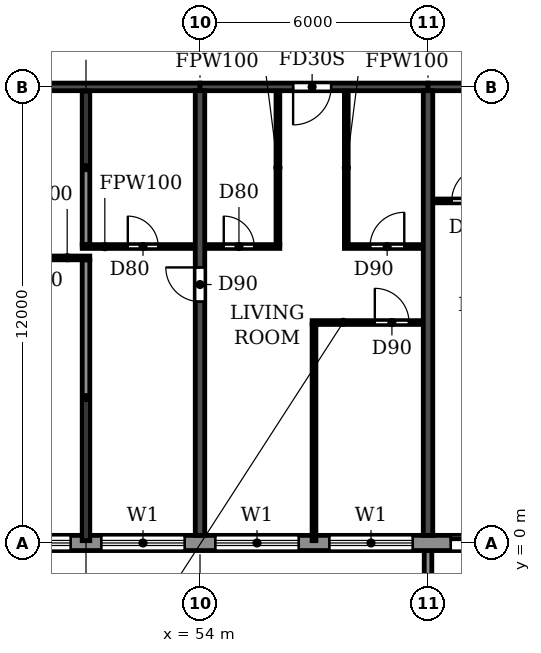
"""IFC4 building model, lengths in metres.
Left out: names, types, materials, properties, quantities, classifications, styles, units other than length and angle.
Written with IfcOpenShell. Run it as: python <this file> out.ifc"""

import sys

from ifc_helpers import new_model, si_unit, direction, frame, frame_2d, origin, place, context, subcontext, project, spatial, polyline, rectangle, outline, extrude, source, transform, mapped, element, fill, save


model = new_model("IFC4")
c1 = context("Model", 3, precision=1e-05, world=origin(), true_north=direction((0.0, 1.0)))
c2 = subcontext(c1, "Body", "Model", "MODEL_VIEW")
j1 = project(units=[si_unit("LENGTHUNIT", "METRE"), si_unit("PLANEANGLEUNIT", "RADIAN")], contexts=[c1])
p1 = place(None, origin())
s1 = spatial("IfcSite", under=j1, at=p1, CompositionType="ELEMENT")
p2 = place(p1, origin())
s2 = spatial("IfcBuilding", under=s1, at=p2, CompositionType="ELEMENT")
p3 = place(p2, frame((0.0, 0.0, 241.2)))
s3 = spatial("IfcBuildingStorey", under=s2, at=p3, CompositionType="ELEMENT", Elevation=241.2)
p4 = place(p3, frame((54.0, 0.2, 0.0), z_axis=(0.0, 0.0, 1.0), x_axis=(0.0, 1.0, 0.0)))
e1 = element("IfcWall", 1, at=p4, inside=s3, PredefinedType="SHEAR", context=c2, shape_type="SweptSolid", body=[
    extrude(rectangle(XDim=11.7, YDim=0.25, at=frame_2d((5.85, 0.0))), origin(), (0.0, 0.0, 1.0), 3.08),
])
p5 = place(p4, frame((6.15, 0.0, 0.0)))
e2 = element("IfcOpeningElement", 2, at=p5, cuts=e1, PredefinedType="OPENING", context=c2, shape_type="SweptSolid", body=[
    extrude(rectangle(XDim=0.9, YDim=2.1, at=frame_2d((0.45, 1.05))), frame((0.0, 0.135, 0.0), z_axis=(0.0, -1.0, 0.0), x_axis=(1.0, 0.0, 0.0)), (0.0, 0.0, 1.0), 0.27),
])
p6 = place(p3, frame((60.0, 0.2, 0.0), z_axis=(0.0, 0.0, 1.0), x_axis=(0.0, 1.0, 0.0)))
e3 = element("IfcWall", 3, at=p6, inside=s3, PredefinedType="SHEAR", context=c2, shape_type="SweptSolid", body=[
    extrude(rectangle(XDim=11.7, YDim=0.25, at=frame_2d((5.85, 0.0))), origin(), (0.0, 0.0, 1.0), 3.08),
])
p7 = place(p3, frame((48.0, 12.0, 0.0), z_axis=(0.0, 0.0, 1.0), x_axis=(1.0, 0.0, 0.0)))
e4 = element("IfcWall", 4, at=p7, inside=s3, PredefinedType="SHEAR", context=c2, shape_type="SweptSolid", body=[
    extrude(rectangle(XDim=6.0, YDim=0.2, at=frame_2d((3.0, 0.0))), origin(), (0.0, 0.0, 1.0), 2.48),
])
p8 = place(p3, frame((54.0, 12.0, 0.0), z_axis=(0.0, 0.0, 1.0), x_axis=(1.0, 0.0, 0.0)))
e5 = element("IfcWall", 5, at=p8, inside=s3, PredefinedType="SHEAR", context=c2, shape_type="SweptSolid", body=[
    extrude(rectangle(XDim=6.0, YDim=0.2, at=frame_2d((3.0, 0.0))), origin(), (0.0, 0.0, 1.0), 2.48),
])
p9 = place(p8, frame((2.45, 0.0, 0.0)))
e6 = element("IfcOpeningElement", 6, at=p9, cuts=e5, PredefinedType="OPENING", context=c2, shape_type="SweptSolid", body=[
    extrude(rectangle(XDim=1.0, YDim=2.1, at=frame_2d((0.5, 1.05))), frame((0.0, 0.11, 0.0), z_axis=(0.0, -1.0, 0.0), x_axis=(1.0, 0.0, 0.0)), (0.0, 0.0, 1.0), 0.22),
])
p10 = place(p3, frame((60.0, 12.0, 0.0), z_axis=(0.0, 0.0, 1.0), x_axis=(1.0, 0.0, 0.0)))
e7 = element("IfcWall", 7, at=p10, inside=s3, PredefinedType="SHEAR", context=c2, shape_type="SweptSolid", body=[
    extrude(rectangle(XDim=6.0, YDim=0.2, at=frame_2d((3.0, 0.0))), origin(), (0.0, 0.0, 1.0), 2.48),
])
p11 = place(p10, frame((2.55, 0.0, 0.0)))
e8 = element("IfcOpeningElement", 8, at=p11, cuts=e7, PredefinedType="OPENING", context=c2, shape_type="SweptSolid", body=[
    extrude(rectangle(XDim=1.0, YDim=2.1, at=frame_2d((0.5, 1.05))), frame((0.0, 0.11, 0.0), z_axis=(0.0, -1.0, 0.0), x_axis=(1.0, 0.0, 0.0)), (0.0, 0.0, 1.0), 0.22),
])
p12 = place(p3, frame((22.683, 0.0, 0.0), z_axis=(0.0, 0.0, 1.0), x_axis=(1.0, 0.0, 0.0)))
e9 = element("IfcWall", 9, at=p12, inside=s3, PredefinedType="STANDARD", context=c2, shape_type="SweptSolid", body=[
    extrude(rectangle(XDim=56.634, YDim=0.4, at=frame_2d((28.317, 0.0))), origin(), (0.0, 0.0, 1.0), 3.08),
])
p13 = place(p12, frame((1.717, 0.0, 0.9)))
e10 = element("IfcOpeningElement", 10, at=p13, cuts=e9, PredefinedType="OPENING", context=c2, shape_type="SweptSolid", body=[
    extrude(rectangle(XDim=2.2, YDim=1.5, at=frame_2d((1.1, 0.75))), frame((0.0, 0.21, 0.0), z_axis=(0.0, -1.0, 0.0), x_axis=(1.0, 0.0, 0.0)), (0.0, 0.0, 1.0), 0.42),
])
p14 = place(p12, frame((4.917, 0.0, 0.0)))
e11 = element("IfcOpeningElement", 11, at=p14, cuts=e9, PredefinedType="OPENING", context=c2, shape_type="SweptSolid", body=[
    extrude(rectangle(XDim=1.8, YDim=2.4, at=frame_2d((0.9, 1.2))), frame((0.0, 0.21, 0.0), z_axis=(0.0, -1.0, 0.0), x_axis=(1.0, 0.0, 0.0)), (0.0, 0.0, 1.0), 0.42),
])
p15 = place(p12, frame((7.717, 0.0, 0.9)))
e12 = element("IfcOpeningElement", 12, at=p15, cuts=e9, PredefinedType="OPENING", context=c2, shape_type="SweptSolid", body=[
    extrude(rectangle(XDim=2.2, YDim=1.5, at=frame_2d((1.1, 0.75))), frame((0.0, 0.21, 0.0), z_axis=(0.0, -1.0, 0.0), x_axis=(1.0, 0.0, 0.0)), (0.0, 0.0, 1.0), 0.42),
])
p16 = place(p12, frame((10.717, 0.0, 0.9)))
e13 = element("IfcOpeningElement", 13, at=p16, cuts=e9, PredefinedType="OPENING", context=c2, shape_type="SweptSolid", body=[
    extrude(rectangle(XDim=2.2, YDim=1.5, at=frame_2d((1.1, 0.75))), frame((0.0, 0.21, 0.0), z_axis=(0.0, -1.0, 0.0), x_axis=(1.0, 0.0, 0.0)), (0.0, 0.0, 1.0), 0.42),
])
p17 = place(p12, frame((13.717, 0.0, 0.9)))
e14 = element("IfcOpeningElement", 14, at=p17, cuts=e9, PredefinedType="OPENING", context=c2, shape_type="SweptSolid", body=[
    extrude(rectangle(XDim=2.2, YDim=1.5, at=frame_2d((1.1, 0.75))), frame((0.0, 0.21, 0.0), z_axis=(0.0, -1.0, 0.0), x_axis=(1.0, 0.0, 0.0)), (0.0, 0.0, 1.0), 0.42),
])
p18 = place(p12, frame((16.917, 0.0, 0.0)))
e15 = element("IfcOpeningElement", 15, at=p18, cuts=e9, PredefinedType="OPENING", context=c2, shape_type="SweptSolid", body=[
    extrude(rectangle(XDim=1.8, YDim=2.4, at=frame_2d((0.9, 1.2))), frame((0.0, 0.21, 0.0), z_axis=(0.0, -1.0, 0.0), x_axis=(1.0, 0.0, 0.0)), (0.0, 0.0, 1.0), 0.42),
])
p19 = place(p12, frame((19.717, 0.0, 0.9)))
e16 = element("IfcOpeningElement", 16, at=p19, cuts=e9, PredefinedType="OPENING", context=c2, shape_type="SweptSolid", body=[
    extrude(rectangle(XDim=2.2, YDim=1.5, at=frame_2d((1.1, 0.75))), frame((0.0, 0.21, 0.0), z_axis=(0.0, -1.0, 0.0), x_axis=(1.0, 0.0, 0.0)), (0.0, 0.0, 1.0), 0.42),
])
p20 = place(p12, frame((22.717, 0.0, 0.9)))
e17 = element("IfcOpeningElement", 17, at=p20, cuts=e9, PredefinedType="OPENING", context=c2, shape_type="SweptSolid", body=[
    extrude(rectangle(XDim=2.2, YDim=1.5, at=frame_2d((1.1, 0.75))), frame((0.0, 0.21, 0.0), z_axis=(0.0, -1.0, 0.0), x_axis=(1.0, 0.0, 0.0)), (0.0, 0.0, 1.0), 0.42),
])
p21 = place(p12, frame((25.717, 0.0, 0.9)))
e18 = element("IfcOpeningElement", 18, at=p21, cuts=e9, PredefinedType="OPENING", context=c2, shape_type="SweptSolid", body=[
    extrude(rectangle(XDim=2.2, YDim=1.5, at=frame_2d((1.1, 0.75))), frame((0.0, 0.21, 0.0), z_axis=(0.0, -1.0, 0.0), x_axis=(1.0, 0.0, 0.0)), (0.0, 0.0, 1.0), 0.42),
])
p22 = place(p12, frame((28.717, 0.0, 0.9)))
e19 = element("IfcOpeningElement", 19, at=p22, cuts=e9, PredefinedType="OPENING", context=c2, shape_type="SweptSolid", body=[
    extrude(rectangle(XDim=2.2, YDim=1.5, at=frame_2d((1.1, 0.75))), frame((0.0, 0.21, 0.0), z_axis=(0.0, -1.0, 0.0), x_axis=(1.0, 0.0, 0.0)), (0.0, 0.0, 1.0), 0.42),
])
p23 = place(p12, frame((31.717, 0.0, 0.9)))
e20 = element("IfcOpeningElement", 20, at=p23, cuts=e9, PredefinedType="OPENING", context=c2, shape_type="SweptSolid", body=[
    extrude(rectangle(XDim=2.2, YDim=1.5, at=frame_2d((1.1, 0.75))), frame((0.0, 0.21, 0.0), z_axis=(0.0, -1.0, 0.0), x_axis=(1.0, 0.0, 0.0)), (0.0, 0.0, 1.0), 0.42),
])
p24 = place(p12, frame((34.717, 0.0, 0.9)))
e21 = element("IfcOpeningElement", 21, at=p24, cuts=e9, PredefinedType="OPENING", context=c2, shape_type="SweptSolid", body=[
    extrude(rectangle(XDim=2.2, YDim=1.5, at=frame_2d((1.1, 0.75))), frame((0.0, 0.21, 0.0), z_axis=(0.0, -1.0, 0.0), x_axis=(1.0, 0.0, 0.0)), (0.0, 0.0, 1.0), 0.42),
])
p25 = place(p12, frame((37.917, 0.0, 0.0)))
e22 = element("IfcOpeningElement", 22, at=p25, cuts=e9, PredefinedType="OPENING", context=c2, shape_type="SweptSolid", body=[
    extrude(rectangle(XDim=1.8, YDim=2.4, at=frame_2d((0.9, 1.2))), frame((0.0, 0.21, 0.0), z_axis=(0.0, -1.0, 0.0), x_axis=(1.0, 0.0, 0.0)), (0.0, 0.0, 1.0), 0.42),
])
p26 = place(p12, frame((40.717, 0.0, 0.9)))
e23 = element("IfcOpeningElement", 23, at=p26, cuts=e9, PredefinedType="OPENING", context=c2, shape_type="SweptSolid", body=[
    extrude(rectangle(XDim=2.2, YDim=1.5, at=frame_2d((1.1, 0.75))), frame((0.0, 0.21, 0.0), z_axis=(0.0, -1.0, 0.0), x_axis=(1.0, 0.0, 0.0)), (0.0, 0.0, 1.0), 0.42),
])
p27 = place(p12, frame((43.717, 0.0, 0.9)))
e24 = element("IfcOpeningElement", 24, at=p27, cuts=e9, PredefinedType="OPENING", context=c2, shape_type="SweptSolid", body=[
    extrude(rectangle(XDim=2.2, YDim=1.5, at=frame_2d((1.1, 0.75))), frame((0.0, 0.21, 0.0), z_axis=(0.0, -1.0, 0.0), x_axis=(1.0, 0.0, 0.0)), (0.0, 0.0, 1.0), 0.42),
])
p28 = place(p12, frame((46.717, 0.0, 0.9)))
e25 = element("IfcOpeningElement", 25, at=p28, cuts=e9, PredefinedType="OPENING", context=c2, shape_type="SweptSolid", body=[
    extrude(rectangle(XDim=2.2, YDim=1.5, at=frame_2d((1.1, 0.75))), frame((0.0, 0.21, 0.0), z_axis=(0.0, -1.0, 0.0), x_axis=(1.0, 0.0, 0.0)), (0.0, 0.0, 1.0), 0.42),
])
p29 = place(p12, frame((49.717, 0.0, 0.9)))
e26 = element("IfcOpeningElement", 26, at=p29, cuts=e9, PredefinedType="OPENING", context=c2, shape_type="SweptSolid", body=[
    extrude(rectangle(XDim=2.2, YDim=1.5, at=frame_2d((1.1, 0.75))), frame((0.0, 0.21, 0.0), z_axis=(0.0, -1.0, 0.0), x_axis=(1.0, 0.0, 0.0)), (0.0, 0.0, 1.0), 0.42),
])
p30 = place(p12, frame((52.917, 0.0, 0.0)))
e27 = element("IfcOpeningElement", 27, at=p30, cuts=e9, PredefinedType="OPENING", context=c2, shape_type="SweptSolid", body=[
    extrude(rectangle(XDim=1.8, YDim=2.4, at=frame_2d((0.9, 1.2))), frame((0.0, 0.21, 0.0), z_axis=(0.0, -1.0, 0.0), x_axis=(1.0, 0.0, 0.0)), (0.0, 0.0, 1.0), 0.42),
])
m1 = source(origin(), c2, "Body", "SweptSolid", [
    extrude(outline(polyline([(0.0, 0.0), (0.2, 0.0), (0.2, 1.65), (0.0, 1.65), (0.0, 0.0)])), origin(), (0.0, 0.0, 1.0), 3.1),
])
p31 = place(p3, frame((59.9, -1.85, 0.0)))
e28 = element("IfcWall", 28, at=p31, inside=s3, PredefinedType="STANDARD", context=c2, shape_type="MappedRepresentation", body=[
    mapped(m1, transform((0.0, 0.0, 0.0))),
])
p32 = place(p3, frame((51.0, 0.06, 0.0), z_axis=(0.0, 0.0, 1.0), x_axis=(0.0, 1.0, 0.0)))
e29 = element("IfcWall", 29, at=p32, inside=s3, PredefinedType="PARTITIONING", context=c2, shape_type="SweptSolid", body=[
    extrude(rectangle(XDim=7.39, YDim=0.2, at=frame_2d((3.695, 0.0))), origin(), (0.0, 0.0, 1.0), 3.08),
])
p33 = place(p3, frame((51.0, 7.85, 0.0), z_axis=(0.0, 0.0, 1.0), x_axis=(0.0, 1.0, 0.0)))
e30 = element("IfcWall", 30, at=p33, inside=s3, PredefinedType="PARTITIONING", context=c2, shape_type="SweptSolid", body=[
    extrude(rectangle(XDim=4.04, YDim=0.2, at=frame_2d((2.02, 0.0))), origin(), (0.0, 0.0, 1.0), 3.08),
])
p34 = place(p3, frame((56.95, 5.8, 0.0), z_axis=(0.0, 0.0, 1.0), x_axis=(1.0, 0.0, 0.0)))
e31 = element("IfcWall", 31, at=p34, inside=s3, PredefinedType="PARTITIONING", context=c2, shape_type="SweptSolid", body=[
    extrude(rectangle(XDim=2.915, YDim=0.1, at=frame_2d((1.458, 0.0))), origin(), (0.0, 0.0, 1.0), 3.08),
])
p35 = place(p34, frame((1.65, 0.0, 0.0)))
e32 = element("IfcOpeningElement", 32, at=p35, cuts=e31, PredefinedType="OPENING", context=c2, shape_type="SweptSolid", body=[
    extrude(rectangle(XDim=0.9, YDim=2.1, at=frame_2d((0.45, 1.05))), frame((0.0, 0.06, 0.0), z_axis=(0.0, -1.0, 0.0), x_axis=(1.0, 0.0, 0.0)), (0.0, 0.0, 1.0), 0.12),
])
p36 = place(p3, frame((48.135, 7.5, 0.0), z_axis=(0.0, 0.0, 1.0), x_axis=(1.0, 0.0, 0.0)))
e33 = element("IfcWall", 33, at=p36, inside=s3, PredefinedType="PARTITIONING", context=c2, shape_type="SweptSolid", body=[
    extrude(rectangle(XDim=2.965, YDim=0.1, at=frame_2d((1.482, 0.0))), origin(), (0.0, 0.0, 1.0), 3.08),
])
p37 = place(p36, frame((0.965, 0.0, 0.0)))
e34 = element("IfcOpeningElement", 34, at=p37, cuts=e33, PredefinedType="OPENING", context=c2, shape_type="SweptSolid", body=[
    extrude(rectangle(XDim=0.8, YDim=2.1, at=frame_2d((0.4, 1.05))), frame((0.0, 0.06, 0.0), z_axis=(0.0, -1.0, 0.0), x_axis=(1.0, 0.0, 0.0)), (0.0, 0.0, 1.0), 0.12),
])
p38 = place(p3, frame((50.9, 7.8, 0.0), z_axis=(0.0, 0.0, 1.0), x_axis=(1.0, 0.0, 0.0)))
e35 = element("IfcWall", 35, at=p38, inside=s3, PredefinedType="PARTITIONING", context=c2, shape_type="SweptSolid", body=[
    extrude(rectangle(XDim=2.965, YDim=0.1, at=frame_2d((1.482, 0.0))), origin(), (0.0, 0.0, 1.0), 3.08),
])
p39 = place(p38, frame((1.2, 0.0, 0.0)))
e36 = element("IfcOpeningElement", 36, at=p39, cuts=e35, PredefinedType="OPENING", context=c2, shape_type="SweptSolid", body=[
    extrude(rectangle(XDim=0.8, YDim=2.1, at=frame_2d((0.4, 1.05))), frame((0.0, 0.06, 0.0), z_axis=(0.0, -1.0, 0.0), x_axis=(1.0, 0.0, 0.0)), (0.0, 0.0, 1.0), 0.12),
])
p40 = place(p3, frame((54.135, 7.8, 0.0), z_axis=(0.0, 0.0, 1.0), x_axis=(1.0, 0.0, 0.0)))
e37 = element("IfcWall", 37, at=p40, inside=s3, PredefinedType="PARTITIONING", context=c2, shape_type="SweptSolid", body=[
    extrude(rectangle(XDim=1.965, YDim=0.1, at=frame_2d((0.982, 0.0))), origin(), (0.0, 0.0, 1.0), 3.08),
])
p41 = place(p40, frame((0.49, 0.0, 0.0)))
e38 = element("IfcOpeningElement", 38, at=p41, cuts=e37, PredefinedType="OPENING", context=c2, shape_type="SweptSolid", body=[
    extrude(rectangle(XDim=0.8, YDim=2.1, at=frame_2d((0.4, 1.05))), frame((0.0, 0.06, 0.0), z_axis=(0.0, -1.0, 0.0), x_axis=(1.0, 0.0, 0.0)), (0.0, 0.0, 1.0), 0.12),
])
p42 = place(p3, frame((57.8, 7.8, 0.0), z_axis=(0.0, 0.0, 1.0), x_axis=(1.0, 0.0, 0.0)))
e39 = element("IfcWall", 39, at=p42, inside=s3, PredefinedType="PARTITIONING", context=c2, shape_type="SweptSolid", body=[
    extrude(rectangle(XDim=2.065, YDim=0.1, at=frame_2d((1.032, 0.0))), origin(), (0.0, 0.0, 1.0), 3.08),
])
p43 = place(p42, frame((0.675, 0.0, 0.0)))
e40 = element("IfcOpeningElement", 40, at=p43, cuts=e39, PredefinedType="OPENING", context=c2, shape_type="SweptSolid", body=[
    extrude(rectangle(XDim=0.9, YDim=2.1, at=frame_2d((0.45, 1.05))), frame((0.0, 0.06, 0.0), z_axis=(0.0, -1.0, 0.0), x_axis=(1.0, 0.0, 0.0)), (0.0, 0.0, 1.0), 0.12),
])
p44 = place(p3, frame((60.135, 9.0, 0.0), z_axis=(0.0, 0.0, 1.0), x_axis=(1.0, 0.0, 0.0)))
e41 = element("IfcWall", 41, at=p44, inside=s3, PredefinedType="PARTITIONING", context=c2, shape_type="SweptSolid", body=[
    extrude(rectangle(XDim=2.065, YDim=0.1, at=frame_2d((1.032, 0.0))), origin(), (0.0, 0.0, 1.0), 3.08),
])
p45 = place(p44, frame((0.49, 0.0, 0.0)))
e42 = element("IfcOpeningElement", 42, at=p45, cuts=e41, PredefinedType="OPENING", context=c2, shape_type="SweptSolid", body=[
    extrude(rectangle(XDim=0.9, YDim=2.1, at=frame_2d((0.45, 1.05))), frame((0.0, 0.06, 0.0), z_axis=(0.0, -1.0, 0.0), x_axis=(1.0, 0.0, 0.0)), (0.0, 0.0, 1.0), 0.12),
])
p46 = place(p3, frame((56.05, 7.85, 0.0), z_axis=(0.0, 0.0, 1.0), x_axis=(0.0, 1.0, 0.0)))
e43 = element("IfcWall", 43, at=p46, inside=s3, PredefinedType="PARTITIONING", context=c2, shape_type="SweptSolid", body=[
    extrude(rectangle(XDim=4.04, YDim=0.1, at=frame_2d((2.02, 0.0))), origin(), (0.0, 0.0, 1.0), 3.08),
])
p47 = place(p3, frame((57.0, 0.06, 0.0), z_axis=(0.0, 0.0, 1.0), x_axis=(0.0, 1.0, 0.0)))
e44 = element("IfcWall", 44, at=p47, inside=s3, PredefinedType="PARTITIONING", context=c2, shape_type="SweptSolid", body=[
    extrude(rectangle(XDim=5.69, YDim=0.1, at=frame_2d((2.845, 0.0))), origin(), (0.0, 0.0, 1.0), 3.08),
])
p48 = place(p3, frame((57.85, 7.85, 0.0), z_axis=(0.0, 0.0, 1.0), x_axis=(0.0, 1.0, 0.0)))
e45 = element("IfcWall", 45, at=p48, inside=s3, PredefinedType="PARTITIONING", context=c2, shape_type="SweptSolid", body=[
    extrude(rectangle(XDim=4.04, YDim=0.1, at=frame_2d((2.02, 0.0))), origin(), (0.0, 0.0, 1.0), 3.08),
])
p49 = place(p21, origin())
e46 = element("IfcWindow", 46, at=p49, inside=s3, PartitioningType="DOUBLE_PANEL_HORIZONTAL", PredefinedType="WINDOW", context=c2, shape_type="SweptSolid", body=[
    extrude(rectangle(XDim=2.2, YDim=1.5, at=frame_2d((1.1, 0.75))), frame((0.0, 0.03, 0.0), z_axis=(0.0, -1.0, 0.0), x_axis=(1.0, 0.0, 0.0)), (0.0, 0.0, 1.0), 0.06),
])
fill(e18, e46)
p50 = place(p22, origin())
e47 = element("IfcWindow", 47, at=p50, inside=s3, PartitioningType="DOUBLE_PANEL_HORIZONTAL", PredefinedType="WINDOW", context=c2, shape_type="SweptSolid", body=[
    extrude(rectangle(XDim=2.2, YDim=1.5, at=frame_2d((1.1, 0.75))), frame((0.0, 0.03, 0.0), z_axis=(0.0, -1.0, 0.0), x_axis=(1.0, 0.0, 0.0)), (0.0, 0.0, 1.0), 0.06),
])
fill(e19, e47)
p51 = place(p23, origin())
e48 = element("IfcWindow", 48, at=p51, inside=s3, PartitioningType="DOUBLE_PANEL_HORIZONTAL", PredefinedType="WINDOW", context=c2, shape_type="SweptSolid", body=[
    extrude(rectangle(XDim=2.2, YDim=1.5, at=frame_2d((1.1, 0.75))), frame((0.0, 0.03, 0.0), z_axis=(0.0, -1.0, 0.0), x_axis=(1.0, 0.0, 0.0)), (0.0, 0.0, 1.0), 0.06),
])
fill(e20, e48)
p52 = place(p24, origin())
e49 = element("IfcWindow", 49, at=p52, inside=s3, PartitioningType="DOUBLE_PANEL_HORIZONTAL", PredefinedType="WINDOW", context=c2, shape_type="SweptSolid", body=[
    extrude(rectangle(XDim=2.2, YDim=1.5, at=frame_2d((1.1, 0.75))), frame((0.0, 0.03, 0.0), z_axis=(0.0, -1.0, 0.0), x_axis=(1.0, 0.0, 0.0)), (0.0, 0.0, 1.0), 0.06),
])
fill(e21, e49)
p53 = place(p25, origin())
e50 = element("IfcDoor", 50, at=p53, inside=s3, OperationType="DOUBLE_DOOR_SLIDING", PredefinedType="DOOR", context=c2, shape_type="SweptSolid", body=[
    extrude(rectangle(XDim=1.8, YDim=2.4, at=frame_2d((0.9, 1.2))), frame((0.0, 0.025, 0.0), z_axis=(0.0, -1.0, 0.0), x_axis=(1.0, 0.0, 0.0)), (0.0, 0.0, 1.0), 0.05),
])
fill(e22, e50)
p54 = place(p39, origin())
e51 = element("IfcDoor", 51, at=p54, inside=s3, OperationType="SINGLE_SWING_LEFT", PredefinedType="DOOR", context=c2, shape_type="SweptSolid", body=[
    extrude(rectangle(XDim=0.8, YDim=2.1, at=frame_2d((0.4, 1.05))), frame((0.0, 0.025, 0.0), z_axis=(0.0, -1.0, 0.0), x_axis=(1.0, 0.0, 0.0)), (0.0, 0.0, 1.0), 0.05),
])
fill(e36, e51)
p55 = place(p5, origin())
e52 = element("IfcDoor", 52, at=p55, inside=s3, OperationType="SINGLE_SWING_RIGHT", PredefinedType="DOOR", context=c2, shape_type="SweptSolid", body=[
    extrude(rectangle(XDim=0.9, YDim=2.1, at=frame_2d((0.45, 1.05))), frame((0.0, 0.025, 0.0), z_axis=(0.0, -1.0, 0.0), x_axis=(1.0, 0.0, 0.0)), (0.0, 0.0, 1.0), 0.05),
])
fill(e2, e52)
p56 = place(p41, origin())
e53 = element("IfcDoor", 53, at=p56, inside=s3, OperationType="SINGLE_SWING_LEFT", PredefinedType="DOOR", context=c2, shape_type="SweptSolid", body=[
    extrude(rectangle(XDim=0.8, YDim=2.1, at=frame_2d((0.4, 1.05))), frame((0.0, 0.025, 0.0), z_axis=(0.0, -1.0, 0.0), x_axis=(1.0, 0.0, 0.0)), (0.0, 0.0, 1.0), 0.05),
])
fill(e38, e53)
p57 = place(p9, frame((1.0, 0.0, 0.0), z_axis=(0.0, 0.0, 1.0), x_axis=(-1.0, 0.0, 0.0)))
e54 = element("IfcDoor", 54, at=p57, inside=s3, OperationType="SINGLE_SWING_RIGHT", PredefinedType="DOOR", context=c2, shape_type="SweptSolid", body=[
    extrude(rectangle(XDim=1.0, YDim=2.1, at=frame_2d((0.5, 1.05))), frame((0.0, 0.025, 0.0), z_axis=(0.0, -1.0, 0.0), x_axis=(1.0, 0.0, 0.0)), (0.0, 0.0, 1.0), 0.05),
])
fill(e6, e54)
p58 = place(p43, origin())
e55 = element("IfcDoor", 55, at=p58, inside=s3, OperationType="SINGLE_SWING_RIGHT", PredefinedType="DOOR", context=c2, shape_type="SweptSolid", body=[
    extrude(rectangle(XDim=0.9, YDim=2.1, at=frame_2d((0.45, 1.05))), frame((0.0, 0.025, 0.0), z_axis=(0.0, -1.0, 0.0), x_axis=(1.0, 0.0, 0.0)), (0.0, 0.0, 1.0), 0.05),
])
fill(e40, e55)
p59 = place(p35, origin())
e56 = element("IfcDoor", 56, at=p59, inside=s3, OperationType="SINGLE_SWING_LEFT", PredefinedType="DOOR", context=c2, shape_type="SweptSolid", body=[
    extrude(rectangle(XDim=0.9, YDim=2.1, at=frame_2d((0.45, 1.05))), frame((0.0, 0.025, 0.0), z_axis=(0.0, -1.0, 0.0), x_axis=(1.0, 0.0, 0.0)), (0.0, 0.0, 1.0), 0.05),
])
fill(e32, e56)
p60 = place(p45, origin())
e57 = element("IfcDoor", 57, at=p60, inside=s3, OperationType="SINGLE_SWING_RIGHT", PredefinedType="DOOR", context=c2, shape_type="SweptSolid", body=[
    extrude(rectangle(XDim=0.9, YDim=2.1, at=frame_2d((0.45, 1.05))), frame((0.0, 0.025, 0.0), z_axis=(0.0, -1.0, 0.0), x_axis=(1.0, 0.0, 0.0)), (0.0, 0.0, 1.0), 0.05),
])
fill(e42, e57)
save(model, sys.argv[1])
